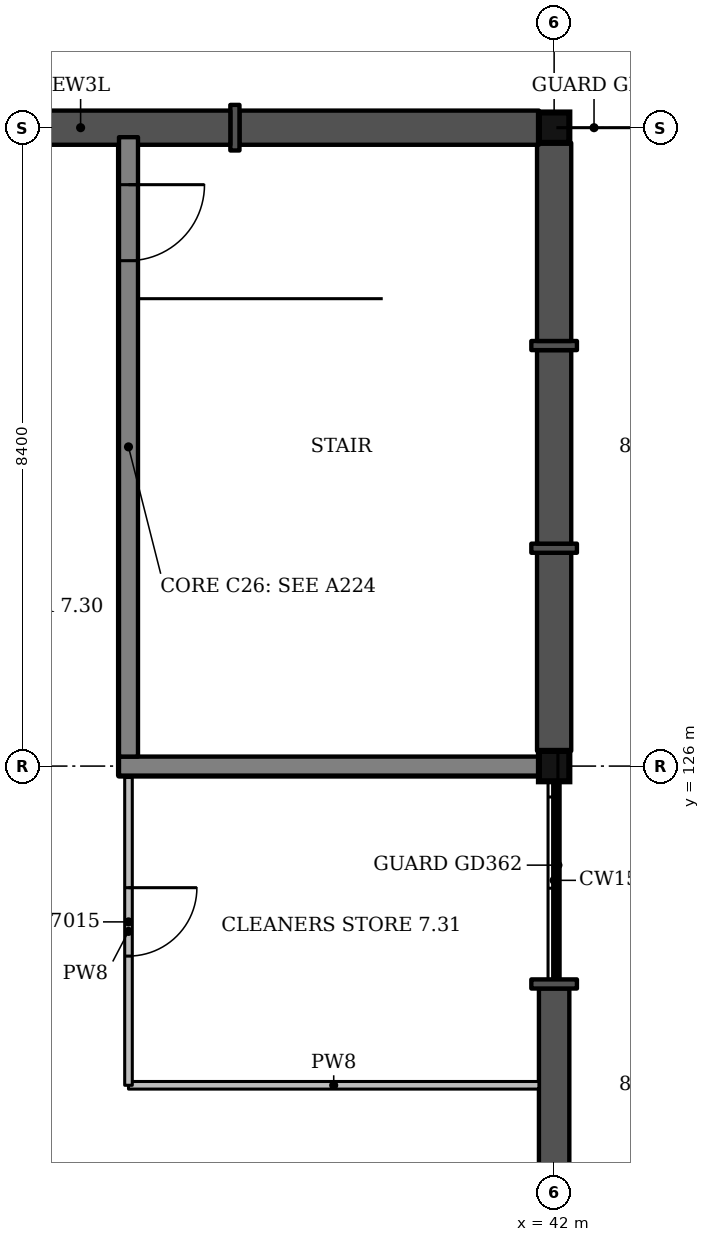
"""IFC4 building model, lengths in metres.
Left out: names, types, materials, properties, quantities, classifications, styles, units other than length and angle.
Written with IfcOpenShell. Run it as: python <this file> out.ifc"""

import sys

from ifc_helpers import new_model, si_unit, direction, frame, frame_2d, origin, origin_2d, place, context, subcontext, project, spatial, rectangle, extrude, element, fill, save


model = new_model("IFC4")
c1 = context("Model", 3, precision=1e-05, world=origin(), true_north=direction((0.0, 1.0)))
c2 = subcontext(c1, "Body", "Model", "MODEL_VIEW")
j1 = project(units=[si_unit("LENGTHUNIT", "METRE"), si_unit("PLANEANGLEUNIT", "RADIAN")], contexts=[c1])
p1 = place(None, origin())
s1 = spatial("IfcSite", under=j1, at=p1, CompositionType="ELEMENT")
p2 = place(p1, origin())
s2 = spatial("IfcBuilding", under=s1, at=p2, CompositionType="ELEMENT")
p3 = place(p2, frame((0.0, 0.0, 31.5)))
s3 = spatial("IfcBuildingStorey", under=s2, at=p3, CompositionType="ELEMENT", Elevation=31.5)
for number, where, z_axis, x_axis in (
    (1, (42.0, 126.0, 0.0), (0.0, 0.0, 1.0), (1.0, 0.0, 0.0)),
    (2, (42.0, 134.4, 0.0), (0.0, 0.0, 1.0), (1.0, 0.0, 0.0)),
):
    element("IfcColumn", number, at=place(p3, frame(where, z_axis=z_axis, x_axis=x_axis)), inside=s3, PredefinedType="COLUMN", context=c2, shape_type="SweptSolid", body=[
        extrude(rectangle(XDim=0.4, YDim=0.4, at=origin_2d()), origin(), (0.0, 0.0, 1.0), 4.5),
    ])
p4 = place(p3, frame((36.275, 126.0, 0.0), z_axis=(0.0, 0.0, 1.0), x_axis=(1.0, 0.0, 0.0)))
e3 = element("IfcWall", 3, at=p4, inside=s3, PredefinedType="SHEAR", context=c2, shape_type="SweptSolid", body=[
    extrude(rectangle(XDim=5.525, YDim=0.25, at=frame_2d((2.763, 0.0))), origin(), (0.0, 0.0, 1.0), 4.2),
])
p5 = place(p3, frame((36.4, 126.125, 0.0), z_axis=(0.0, 0.0, 1.0), x_axis=(0.0, 1.0, 0.0)))
e4 = element("IfcWall", 4, at=p5, inside=s3, PredefinedType="SHEAR", context=c2, shape_type="SweptSolid", body=[
    extrude(rectangle(XDim=8.15, YDim=0.25, at=frame_2d((4.075, 0.0))), origin(), (0.0, 0.0, 1.0), 4.2),
])
p6 = place(p5, frame((6.525, 0.0, 0.0)))
e5 = element("IfcOpeningElement", 5, at=p6, cuts=e4, PredefinedType="OPENING", context=c2, shape_type="SweptSolid", body=[
    extrude(rectangle(XDim=1.0, YDim=2.1, at=frame_2d((0.5, 1.05))), frame((0.0, 0.135, 0.0), z_axis=(0.0, -1.0, 0.0), x_axis=(1.0, 0.0, 0.0)), (0.0, 0.0, 1.0), 0.27),
])
p7 = place(p3, frame((42.0, 120.527, 0.0), z_axis=(0.0, 0.0, 1.0), x_axis=(0.0, 1.0, 0.0)))
e6 = element("IfcWall", 6, at=p7, inside=s3, PredefinedType="SOLIDWALL", context=c2, shape_type="SweptSolid", body=[
    extrude(rectangle(XDim=2.547, YDim=0.4, at=frame_2d((1.273, 0.0))), origin(), (0.0, 0.0, 1.0), 3.6),
])
p8 = place(p3, frame((42.0, 123.073, 0.0), z_axis=(0.0, 0.0, 1.0), x_axis=(0.0, 1.0, 0.0)))
e7 = element("IfcWall", 7, at=p8, inside=s3, PredefinedType="SOLIDWALL", context=c2, shape_type="SweptSolid", body=[
    extrude(rectangle(XDim=0.12, YDim=0.6, at=frame_2d((0.06, 0.0))), origin(), (0.0, 0.0, 1.0), 3.6),
])
p9 = place(p3, frame((42.0, 126.2, 0.0), z_axis=(0.0, 0.0, 1.0), x_axis=(0.0, 1.0, 0.0)))
e8 = element("IfcWall", 8, at=p9, inside=s3, PredefinedType="SOLIDWALL", context=c2, shape_type="SweptSolid", body=[
    extrude(rectangle(XDim=2.607, YDim=0.45, at=frame_2d((1.303, 0.0))), origin(), (0.0, 0.0, 1.0), 4.2),
])
p10 = place(p3, frame((42.0, 128.807, 0.0), z_axis=(0.0, 0.0, 1.0), x_axis=(0.0, 1.0, 0.0)))
e9 = element("IfcWall", 9, at=p10, inside=s3, PredefinedType="SOLIDWALL", context=c2, shape_type="SweptSolid", body=[
    extrude(rectangle(XDim=0.12, YDim=0.6, at=frame_2d((0.06, 0.0))), origin(), (0.0, 0.0, 1.0), 4.2),
])
p11 = place(p3, frame((42.0, 128.927, 0.0), z_axis=(0.0, 0.0, 1.0), x_axis=(0.0, 1.0, 0.0)))
e10 = element("IfcWall", 10, at=p11, inside=s3, PredefinedType="SOLIDWALL", context=c2, shape_type="SweptSolid", body=[
    extrude(rectangle(XDim=2.547, YDim=0.45, at=frame_2d((1.273, 0.0))), origin(), (0.0, 0.0, 1.0), 4.2),
])
p12 = place(p3, frame((42.0, 131.473, 0.0), z_axis=(0.0, 0.0, 1.0), x_axis=(0.0, 1.0, 0.0)))
e11 = element("IfcWall", 11, at=p12, inside=s3, PredefinedType="SOLIDWALL", context=c2, shape_type="SweptSolid", body=[
    extrude(rectangle(XDim=0.12, YDim=0.6, at=frame_2d((0.06, 0.0))), origin(), (0.0, 0.0, 1.0), 4.2),
])
p13 = place(p3, frame((42.0, 131.593, 0.0), z_axis=(0.0, 0.0, 1.0), x_axis=(0.0, 1.0, 0.0)))
e12 = element("IfcWall", 12, at=p13, inside=s3, PredefinedType="SOLIDWALL", context=c2, shape_type="SweptSolid", body=[
    extrude(rectangle(XDim=2.607, YDim=0.45, at=frame_2d((1.303, 0.0))), origin(), (0.0, 0.0, 1.0), 4.2),
])
p14 = place(p3, frame((41.8, 134.4, 0.0), z_axis=(0.0, 0.0, 1.0), x_axis=(-1.0, 0.0, 0.0)))
e13 = element("IfcWall", 13, at=p14, inside=s3, PredefinedType="SOLIDWALL", context=c2, shape_type="SweptSolid", body=[
    extrude(rectangle(XDim=3.94, YDim=0.45, at=frame_2d((1.97, 0.0))), origin(), (0.0, 0.0, 1.0), 3.6),
])
p15 = place(p3, frame((37.86, 134.4, 0.0), z_axis=(0.0, 0.0, 1.0), x_axis=(-1.0, 0.0, 0.0)))
e14 = element("IfcWall", 14, at=p15, inside=s3, PredefinedType="SOLIDWALL", context=c2, shape_type="SweptSolid", body=[
    extrude(rectangle(XDim=0.12, YDim=0.6, at=frame_2d((0.06, 0.0))), origin(), (0.0, 0.0, 1.0), 3.6),
])
p16 = place(p3, frame((37.74, 134.4, 0.0), z_axis=(0.0, 0.0, 1.0), x_axis=(-1.0, 0.0, 0.0)))
e15 = element("IfcWall", 15, at=p16, inside=s3, PredefinedType="SOLIDWALL", context=c2, shape_type="SweptSolid", body=[
    extrude(rectangle(XDim=3.94, YDim=0.45, at=frame_2d((1.97, 0.0))), origin(), (0.0, 0.0, 1.0), 3.6),
])
p17 = place(p3, frame((36.4, 121.8, 0.0), z_axis=(0.0, 0.0, 1.0), x_axis=(1.0, 0.0, 0.0)))
e16 = element("IfcWall", 16, at=p17, inside=s3, PredefinedType="PARTITIONING", context=c2, shape_type="SweptSolid", body=[
    extrude(rectangle(XDim=5.4, YDim=0.1, at=frame_2d((2.7, 0.0))), origin(), (0.0, 0.0, 1.0), 4.15),
])
p18 = place(p3, frame((36.4, 121.8, 0.0), z_axis=(0.0, 0.0, 1.0), x_axis=(0.0, 1.0, 0.0)))
e17 = element("IfcWall", 17, at=p18, inside=s3, PredefinedType="PARTITIONING", context=c2, shape_type="SweptSolid", body=[
    extrude(rectangle(XDim=4.05, YDim=0.1, at=frame_2d((2.025, 0.0))), origin(), (0.0, 0.0, 1.0), 3.6),
])
p19 = place(p18, frame((1.7, 0.0, 0.0)))
e18 = element("IfcOpeningElement", 18, at=p19, cuts=e17, PredefinedType="OPENING", context=c2, shape_type="SweptSolid", body=[
    extrude(rectangle(XDim=0.9, YDim=2.1, at=frame_2d((0.45, 1.05))), frame((0.0, 0.06, 0.0), z_axis=(0.0, -1.0, 0.0), x_axis=(1.0, 0.0, 0.0)), (0.0, 0.0, 1.0), 0.12),
])
p20 = place(p19, origin())
e19 = element("IfcDoor", 19, at=p20, inside=s3, OperationType="SINGLE_SWING_RIGHT", PredefinedType="DOOR", context=c2, shape_type="SweptSolid", body=[
    extrude(rectangle(XDim=0.9, YDim=2.1, at=frame_2d((0.45, 1.05))), frame((0.0, 0.025, 0.0), z_axis=(0.0, -1.0, 0.0), x_axis=(1.0, 0.0, 0.0)), (0.0, 0.0, 1.0), 0.05),
])
fill(e18, e19)
p21 = place(p6, origin())
e20 = element("IfcDoor", 20, at=p21, inside=s3, OperationType="SINGLE_SWING_RIGHT", PredefinedType="DOOR", context=c2, shape_type="SweptSolid", body=[
    extrude(rectangle(XDim=1.0, YDim=2.1, at=frame_2d((0.5, 1.05))), frame((0.0, 0.025, 0.0), z_axis=(0.0, -1.0, 0.0), x_axis=(1.0, 0.0, 0.0)), (0.0, 0.0, 1.0), 0.05),
])
fill(e5, e20)
save(model, sys.argv[1])
